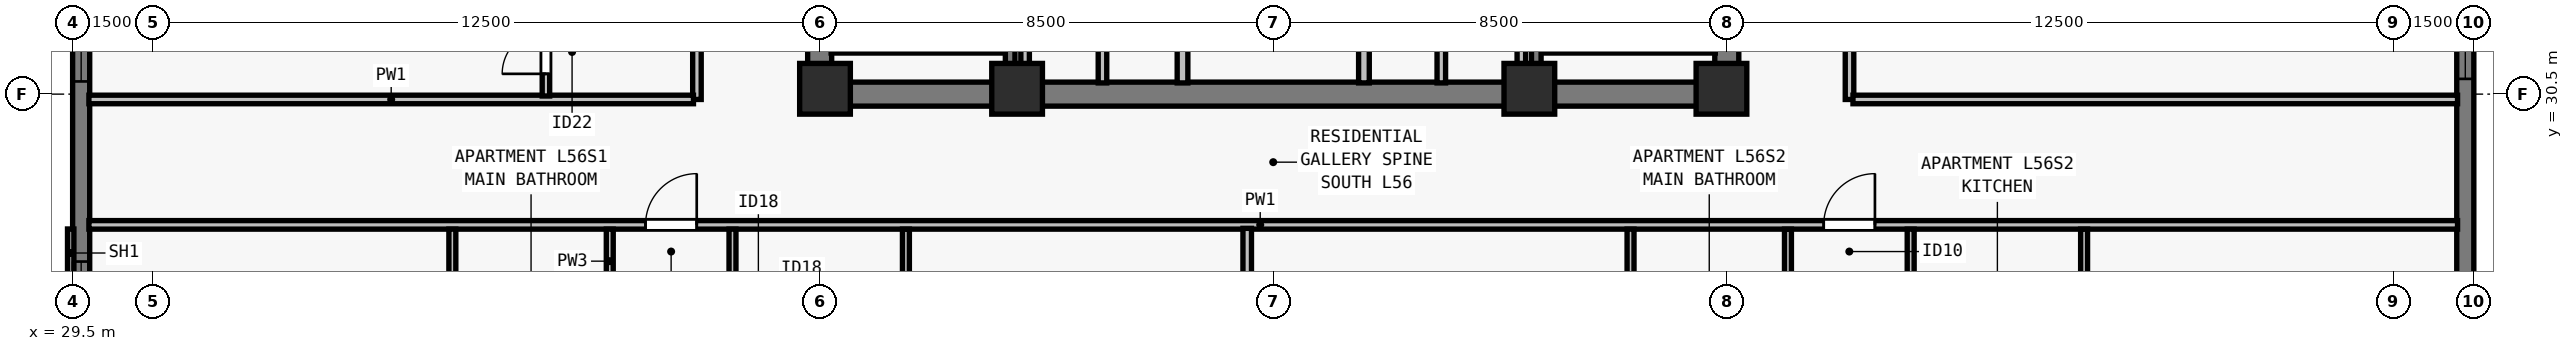
"""IFC4 building model, lengths in metres.
Left out: names, types, materials, properties, quantities, classifications, styles, units other than length and angle.
Written with IfcOpenShell. Run it as: python <this file> out.ifc"""

import sys

from ifc_helpers import new_model, si_unit, direction, frame, frame_2d, origin, origin_2d, place, context, subcontext, project, spatial, rectangle, extrude, element, fill, save


model = new_model("IFC4")
c1 = context("Model", 3, precision=1e-05, world=origin(), true_north=direction((0.0, 1.0)))
c2 = subcontext(c1, "Body", "Model", "MODEL_VIEW")
j1 = project(units=[si_unit("LENGTHUNIT", "METRE"), si_unit("PLANEANGLEUNIT", "RADIAN")], contexts=[c1])
p1 = place(None, origin())
s1 = spatial("IfcSite", under=j1, at=p1, CompositionType="ELEMENT")
p2 = place(p1, origin())
s2 = spatial("IfcBuilding", under=s1, at=p2, CompositionType="ELEMENT")
p3 = place(p2, frame((0.0, 0.0, 206.0)))
s3 = spatial("IfcBuildingStorey", under=s2, at=p3, CompositionType="ELEMENT", Elevation=206.0)
for number, where, z_axis, x_axis in (
    (1, (43.6, 30.6, 0.0), (0.0, 0.0, 1.0), (1.0, 0.0, 0.0)),
    (2, (47.2, 30.6, 0.0), (0.0, 0.0, 1.0), (1.0, 0.0, 0.0)),
    (3, (56.8, 30.6, 0.0), (0.0, 0.0, 1.0), (1.0, 0.0, 0.0)),
    (4, (60.4, 30.6, 0.0), (0.0, 0.0, 1.0), (1.0, 0.0, 0.0)),
):
    element("IfcColumn", number, at=place(p3, frame(where, z_axis=z_axis, x_axis=x_axis)), inside=s3, PredefinedType="COLUMN", context=c2, shape_type="SweptSolid", body=[
        extrude(rectangle(XDim=0.95, YDim=0.95, at=origin_2d()), origin(), (0.0, 0.0, 1.0), 3.5),
    ])
p4 = place(p3, frame((74.34, 56.5, 0.0), z_axis=(0.0, 0.0, 1.0), x_axis=(0.0, -1.0, 0.0)))
e5 = element("IfcWall", 5, at=p4, inside=s3, PredefinedType="SOLIDWALL", context=c2, shape_type="SweptSolid", body=[
    extrude(rectangle(XDim=34.702, YDim=0.32, at=frame_2d((17.351, 0.0))), origin(), (0.0, 0.0, 1.0), 3.29),
])
p5 = place(p4, frame((4.312, 0.0, 0.8)))
e6 = element("IfcOpeningElement", 6, at=p5, cuts=e5, PredefinedType="OPENING", context=c2, shape_type="SweptSolid", body=[
    extrude(rectangle(XDim=1.55, YDim=1.678, at=frame_2d((0.775, 0.839))), frame((0.0, 0.17, 0.0), z_axis=(0.0, -1.0, 0.0), x_axis=(1.0, 0.0, 0.0)), (0.0, 0.0, 1.0), 0.34),
])
p6 = place(p4, frame((9.238, 0.0, 0.8)))
e7 = element("IfcOpeningElement", 7, at=p6, cuts=e5, PredefinedType="OPENING", context=c2, shape_type="SweptSolid", body=[
    extrude(rectangle(XDim=1.85, YDim=1.678, at=frame_2d((0.925, 0.839))), frame((0.0, 0.17, 0.0), z_axis=(0.0, -1.0, 0.0), x_axis=(1.0, 0.0, 0.0)), (0.0, 0.0, 1.0), 0.34),
])
p7 = place(p4, frame((14.738, 0.0, 0.8)))
e8 = element("IfcOpeningElement", 8, at=p7, cuts=e5, PredefinedType="OPENING", context=c2, shape_type="SweptSolid", body=[
    extrude(rectangle(XDim=1.85, YDim=1.678, at=frame_2d((0.925, 0.839))), frame((0.0, 0.17, 0.0), z_axis=(0.0, -1.0, 0.0), x_axis=(1.0, 0.0, 0.0)), (0.0, 0.0, 1.0), 0.34),
])
p8 = place(p4, frame((18.264, 0.0, 0.8)))
e9 = element("IfcOpeningElement", 9, at=p8, cuts=e5, PredefinedType="OPENING", context=c2, shape_type="SweptSolid", body=[
    extrude(rectangle(XDim=1.55, YDim=1.678, at=frame_2d((0.775, 0.839))), frame((0.0, 0.17, 0.0), z_axis=(0.0, -1.0, 0.0), x_axis=(1.0, 0.0, 0.0)), (0.0, 0.0, 1.0), 0.34),
])
p9 = place(p4, frame((24.164, 0.0, 0.8)))
e10 = element("IfcOpeningElement", 10, at=p9, cuts=e5, PredefinedType="OPENING", context=c2, shape_type="SweptSolid", body=[
    extrude(rectangle(XDim=1.55, YDim=1.678, at=frame_2d((0.775, 0.839))), frame((0.0, 0.17, 0.0), z_axis=(0.0, -1.0, 0.0), x_axis=(1.0, 0.0, 0.0)), (0.0, 0.0, 1.0), 0.34),
])
p10 = place(p3, frame((29.66, 21.5, 0.0), z_axis=(0.0, 0.0, 1.0), x_axis=(0.0, 1.0, 0.0)))
e11 = element("IfcWall", 11, at=p10, inside=s3, PredefinedType="SOLIDWALL", context=c2, shape_type="SweptSolid", body=[
    extrude(rectangle(XDim=34.702, YDim=0.32, at=frame_2d((17.351, 0.0))), origin(), (0.0, 0.0, 1.0), 3.29),
])
p11 = place(p10, frame((4.312, 0.0, 0.8)))
e12 = element("IfcOpeningElement", 12, at=p11, cuts=e11, PredefinedType="OPENING", context=c2, shape_type="SweptSolid", body=[
    extrude(rectangle(XDim=1.55, YDim=1.678, at=frame_2d((0.775, 0.839))), frame((0.0, 0.17, 0.0), z_axis=(0.0, -1.0, 0.0), x_axis=(1.0, 0.0, 0.0)), (0.0, 0.0, 1.0), 0.34),
])
p12 = place(p10, frame((9.238, 0.0, 0.8)))
e13 = element("IfcOpeningElement", 13, at=p12, cuts=e11, PredefinedType="OPENING", context=c2, shape_type="SweptSolid", body=[
    extrude(rectangle(XDim=1.85, YDim=1.678, at=frame_2d((0.925, 0.839))), frame((0.0, 0.17, 0.0), z_axis=(0.0, -1.0, 0.0), x_axis=(1.0, 0.0, 0.0)), (0.0, 0.0, 1.0), 0.34),
])
p13 = place(p10, frame((14.738, 0.0, 0.8)))
e14 = element("IfcOpeningElement", 14, at=p13, cuts=e11, PredefinedType="OPENING", context=c2, shape_type="SweptSolid", body=[
    extrude(rectangle(XDim=1.85, YDim=1.678, at=frame_2d((0.925, 0.839))), frame((0.0, 0.17, 0.0), z_axis=(0.0, -1.0, 0.0), x_axis=(1.0, 0.0, 0.0)), (0.0, 0.0, 1.0), 0.34),
])
p14 = place(p10, frame((17.014, 0.0, 0.8)))
e15 = element("IfcOpeningElement", 15, at=p14, cuts=e11, PredefinedType="OPENING", context=c2, shape_type="SweptSolid", body=[
    extrude(rectangle(XDim=1.55, YDim=1.678, at=frame_2d((0.775, 0.839))), frame((0.0, 0.17, 0.0), z_axis=(0.0, -1.0, 0.0), x_axis=(1.0, 0.0, 0.0)), (0.0, 0.0, 1.0), 0.34),
])
p15 = place(p10, frame((24.164, 0.0, 0.8)))
e16 = element("IfcOpeningElement", 16, at=p15, cuts=e11, PredefinedType="OPENING", context=c2, shape_type="SweptSolid", body=[
    extrude(rectangle(XDim=1.55, YDim=1.678, at=frame_2d((0.775, 0.839))), frame((0.0, 0.17, 0.0), z_axis=(0.0, -1.0, 0.0), x_axis=(1.0, 0.0, 0.0)), (0.0, 0.0, 1.0), 0.34),
])
p16 = place(p3, frame((43.275, 30.5, 0.0), z_axis=(0.0, 0.0, 1.0), x_axis=(1.0, 0.0, 0.0)))
e17 = element("IfcWall", 17, at=p16, inside=s3, PredefinedType="SHEAR", context=c2, shape_type="SweptSolid", body=[
    extrude(rectangle(XDim=17.45, YDim=0.45, at=frame_2d((8.725, 0.0))), origin(), (0.0, 0.0, 1.0), 3.29),
])
for number, where, z_axis, x_axis in (
    (18, (43.5, 30.715, 0.0), (0.0, 0.0, 1.0), (0.0, 1.0, 0.0)),
    (19, (60.5, 30.715, 0.0), (0.0, 0.0, 1.0), (0.0, 1.0, 0.0)),
):
    element("IfcWall", number, at=place(p3, frame(where, z_axis=z_axis, x_axis=x_axis)), inside=s3, PredefinedType="SHEAR", context=c2, shape_type="SweptSolid", body=[
        extrude(rectangle(XDim=8.035, YDim=0.45, at=frame_2d((4.018, 0.0))), origin(), (0.0, 0.0, 1.0), 3.29),
    ])
p17 = place(p3, frame((50.3, 30.71, 0.0), z_axis=(0.0, 0.0, 1.0), x_axis=(0.0, 1.0, 0.0)))
e20 = element("IfcWall", 20, at=p17, inside=s3, PredefinedType="SOLIDWALL", context=c2, shape_type="SweptSolid", body=[
    extrude(rectangle(XDim=7.905, YDim=0.2, at=frame_2d((3.953, 0.0))), origin(), (0.0, 0.0, 1.0), 3.29),
])
p18 = place(p17, frame((2.14, 0.0, 0.0)))
e21 = element("IfcOpeningElement", 21, at=p18, cuts=e20, PredefinedType="OPENING", context=c2, shape_type="SweptSolid", body=[
    extrude(rectangle(XDim=0.95, YDim=2.12, at=frame_2d((0.475, 1.06))), frame((0.0, 0.11, 0.0), z_axis=(0.0, -1.0, 0.0), x_axis=(1.0, 0.0, 0.0)), (0.0, 0.0, 1.0), 0.22),
])
p19 = place(p3, frame((53.7, 30.71, 0.0), z_axis=(0.0, 0.0, 1.0), x_axis=(0.0, 1.0, 0.0)))
e22 = element("IfcWall", 22, at=p19, inside=s3, PredefinedType="SOLIDWALL", context=c2, shape_type="SweptSolid", body=[
    extrude(rectangle(XDim=7.905, YDim=0.2, at=frame_2d((3.953, 0.0))), origin(), (0.0, 0.0, 1.0), 3.29),
])
p20 = place(p19, frame((2.14, 0.0, 0.0)))
e23 = element("IfcOpeningElement", 23, at=p20, cuts=e22, PredefinedType="OPENING", context=c2, shape_type="SweptSolid", body=[
    extrude(rectangle(XDim=0.95, YDim=2.12, at=frame_2d((0.475, 1.06))), frame((0.0, 0.11, 0.0), z_axis=(0.0, -1.0, 0.0), x_axis=(1.0, 0.0, 0.0)), (0.0, 0.0, 1.0), 0.22),
])
p21 = place(p3, frame((47.35, 30.71, 0.0), z_axis=(0.0, 0.0, 1.0), x_axis=(0.0, 1.0, 0.0)))
e24 = element("IfcWall", 24, at=p21, inside=s3, PredefinedType="PARTITIONING", context=c2, shape_type="SweptSolid", body=[
    extrude(rectangle(XDim=7.905, YDim=0.16, at=frame_2d((3.953, 0.0))), origin(), (0.0, 0.0, 1.0), 3.29),
])
p22 = place(p3, frame((48.8, 30.71, 0.0), z_axis=(0.0, 0.0, 1.0), x_axis=(0.0, 1.0, 0.0)))
e25 = element("IfcWall", 25, at=p22, inside=s3, PredefinedType="PARTITIONING", context=c2, shape_type="SweptSolid", body=[
    extrude(rectangle(XDim=7.905, YDim=0.16, at=frame_2d((3.953, 0.0))), origin(), (0.0, 0.0, 1.0), 3.29),
])
p23 = place(p22, frame((3.54, 0.0, 0.0)))
e26 = element("IfcOpeningElement", 26, at=p23, cuts=e25, PredefinedType="OPENING", context=c2, shape_type="SweptSolid", body=[
    extrude(rectangle(XDim=0.85, YDim=2.12, at=frame_2d((0.425, 1.06))), frame((0.0, 0.09, 0.0), z_axis=(0.0, -1.0, 0.0), x_axis=(1.0, 0.0, 0.0)), (0.0, 0.0, 1.0), 0.18),
])
p24 = place(p3, frame((56.65, 30.71, 0.0), z_axis=(0.0, 0.0, 1.0), x_axis=(0.0, 1.0, 0.0)))
e27 = element("IfcWall", 27, at=p24, inside=s3, PredefinedType="PARTITIONING", context=c2, shape_type="SweptSolid", body=[
    extrude(rectangle(XDim=7.905, YDim=0.16, at=frame_2d((3.953, 0.0))), origin(), (0.0, 0.0, 1.0), 3.29),
])
p25 = place(p3, frame((55.15, 30.71, 0.0), z_axis=(0.0, 0.0, 1.0), x_axis=(0.0, 1.0, 0.0)))
e28 = element("IfcWall", 28, at=p25, inside=s3, PredefinedType="PARTITIONING", context=c2, shape_type="SweptSolid", body=[
    extrude(rectangle(XDim=7.905, YDim=0.16, at=frame_2d((3.953, 0.0))), origin(), (0.0, 0.0, 1.0), 3.29),
])
p26 = place(p25, frame((3.54, 0.0, 0.0)))
e29 = element("IfcOpeningElement", 29, at=p26, cuts=e28, PredefinedType="OPENING", context=c2, shape_type="SweptSolid", body=[
    extrude(rectangle(XDim=0.85, YDim=2.12, at=frame_2d((0.425, 1.06))), frame((0.0, 0.09, 0.0), z_axis=(0.0, -1.0, 0.0), x_axis=(1.0, 0.0, 0.0)), (0.0, 0.0, 1.0), 0.18),
])
p27 = place(p3, frame((29.805, 28.05, 0.0), z_axis=(0.0, 0.0, 1.0), x_axis=(1.0, 0.0, 0.0)))
e30 = element("IfcWall", 30, at=p27, inside=s3, PredefinedType="PARTITIONING", context=c2, shape_type="SweptSolid", body=[
    extrude(rectangle(XDim=44.39, YDim=0.16, at=frame_2d((22.195, 0.0))), origin(), (0.0, 0.0, 1.0), 2.958),
])
p28 = place(p27, frame((10.431, 0.0, 0.0)))
e31 = element("IfcOpeningElement", 31, at=p28, cuts=e30, PredefinedType="OPENING", context=c2, shape_type="SweptSolid", body=[
    extrude(rectangle(XDim=0.96, YDim=2.18, at=frame_2d((0.48, 1.09))), frame((0.0, 0.09, 0.0), z_axis=(0.0, -1.0, 0.0), x_axis=(1.0, 0.0, 0.0)), (0.0, 0.0, 1.0), 0.18),
])
p29 = place(p27, frame((32.511, 0.0, 0.0)))
e32 = element("IfcOpeningElement", 32, at=p29, cuts=e30, PredefinedType="OPENING", context=c2, shape_type="SweptSolid", body=[
    extrude(rectangle(XDim=0.96, YDim=2.18, at=frame_2d((0.48, 1.09))), frame((0.0, 0.09, 0.0), z_axis=(0.0, -1.0, 0.0), x_axis=(1.0, 0.0, 0.0)), (0.0, 0.0, 1.0), 0.18),
])
p30 = place(p3, frame((41.2, 30.4, 0.0), z_axis=(0.0, 0.0, 1.0), x_axis=(0.0, 1.0, 0.0)))
e33 = element("IfcWall", 33, at=p30, inside=s3, PredefinedType="PARTITIONING", context=c2, shape_type="SweptSolid", body=[
    extrude(rectangle(XDim=17.2, YDim=0.16, at=frame_2d((8.6, 0.0))), origin(), (0.0, 0.0, 1.0), 3.29),
])
p31 = place(p30, frame((8.12, 0.0, 0.0)))
e34 = element("IfcOpeningElement", 34, at=p31, cuts=e33, PredefinedType="OPENING", context=c2, shape_type="SweptSolid", body=[
    extrude(rectangle(XDim=0.96, YDim=2.18, at=frame_2d((0.48, 1.09))), frame((0.0, 0.09, 0.0), z_axis=(0.0, -1.0, 0.0), x_axis=(1.0, 0.0, 0.0)), (0.0, 0.0, 1.0), 0.18),
])
p32 = place(p3, frame((62.8, 30.4, 0.0), z_axis=(0.0, 0.0, 1.0), x_axis=(0.0, 1.0, 0.0)))
e35 = element("IfcWall", 35, at=p32, inside=s3, PredefinedType="PARTITIONING", context=c2, shape_type="SweptSolid", body=[
    extrude(rectangle(XDim=17.2, YDim=0.16, at=frame_2d((8.6, 0.0))), origin(), (0.0, 0.0, 1.0), 3.29),
])
p33 = place(p32, frame((3.6, 0.0, 0.0)))
e36 = element("IfcOpeningElement", 36, at=p33, cuts=e35, PredefinedType="OPENING", context=c2, shape_type="SweptSolid", body=[
    extrude(rectangle(XDim=0.96, YDim=2.12, at=frame_2d((0.48, 1.06))), frame((0.0, 0.09, 0.0), z_axis=(0.0, -1.0, 0.0), x_axis=(1.0, 0.0, 0.0)), (0.0, 0.0, 1.0), 0.18),
])
p34 = place(p32, frame((12.44, 0.0, 0.0)))
e37 = element("IfcOpeningElement", 37, at=p34, cuts=e35, PredefinedType="OPENING", context=c2, shape_type="SweptSolid", body=[
    extrude(rectangle(XDim=0.96, YDim=2.18, at=frame_2d((0.48, 1.09))), frame((0.0, 0.09, 0.0), z_axis=(0.0, -1.0, 0.0), x_axis=(1.0, 0.0, 0.0)), (0.0, 0.0, 1.0), 0.18),
])
for number, where, z_axis, x_axis in (
    (38, (29.805, 30.4, 0.0), (0.0, 0.0, 1.0), (1.0, 0.0, 0.0)),
    (39, (62.865, 30.4, 0.0), (0.0, 0.0, 1.0), (1.0, 0.0, 0.0)),
):
    element("IfcWall", number, at=place(p3, frame(where, z_axis=z_axis, x_axis=x_axis)), inside=s3, PredefinedType="PARTITIONING", context=c2, shape_type="SweptSolid", body=[
        extrude(rectangle(XDim=11.33, YDim=0.16, at=frame_2d((5.665, 0.0))), origin(), (0.0, 0.0, 1.0), 3.29),
    ])
p35 = place(p3, frame((36.616, 25.22, 0.0), z_axis=(0.0, 0.0, 1.0), x_axis=(0.0, 1.0, 0.0)))
e40 = element("IfcWall", 40, at=p35, inside=s3, PredefinedType="PLUMBINGWALL", context=c2, shape_type="SweptSolid", body=[
    extrude(rectangle(XDim=2.75, YDim=0.13, at=frame_2d((1.375, 0.0))), origin(), (0.0, 0.0, 1.0), 3.29),
])
p36 = place(p3, frame((39.566, 25.22, 0.0), z_axis=(0.0, 0.0, 1.0), x_axis=(0.0, 1.0, 0.0)))
e41 = element("IfcWall", 41, at=p36, inside=s3, PredefinedType="PLUMBINGWALL", context=c2, shape_type="SweptSolid", body=[
    extrude(rectangle(XDim=2.75, YDim=0.13, at=frame_2d((1.375, 0.0))), origin(), (0.0, 0.0, 1.0), 3.29),
])
p37 = place(p36, frame((0.55, 0.0, 0.0)))
e42 = element("IfcOpeningElement", 42, at=p37, cuts=e41, PredefinedType="OPENING", context=c2, shape_type="SweptSolid", body=[
    extrude(rectangle(XDim=0.85, YDim=2.08, at=frame_2d((0.425, 1.04))), frame((0.0, 0.075, 0.0), z_axis=(0.0, -1.0, 0.0), x_axis=(1.0, 0.0, 0.0)), (0.0, 0.0, 1.0), 0.15),
])
p38 = place(p3, frame((45.116, 25.22, 0.0), z_axis=(0.0, 0.0, 1.0), x_axis=(0.0, 1.0, 0.0)))
e43 = element("IfcWall", 43, at=p38, inside=s3, PredefinedType="PLUMBINGWALL", context=c2, shape_type="SweptSolid", body=[
    extrude(rectangle(XDim=2.75, YDim=0.13, at=frame_2d((1.375, 0.0))), origin(), (0.0, 0.0, 1.0), 3.29),
])
p39 = place(p3, frame((41.866, 25.22, 0.0), z_axis=(0.0, 0.0, 1.0), x_axis=(0.0, 1.0, 0.0)))
e44 = element("IfcWall", 44, at=p39, inside=s3, PredefinedType="PLUMBINGWALL", context=c2, shape_type="SweptSolid", body=[
    extrude(rectangle(XDim=2.75, YDim=0.13, at=frame_2d((1.375, 0.0))), origin(), (0.0, 0.0, 1.0), 2.573),
])
p40 = place(p39, frame((0.55, 0.0, 0.0)))
e45 = element("IfcOpeningElement", 45, at=p40, cuts=e44, PredefinedType="OPENING", context=c2, shape_type="SweptSolid", body=[
    extrude(rectangle(XDim=0.88, YDim=2.1, at=frame_2d((0.44, 1.05))), frame((0.0, 0.075, 0.0), z_axis=(0.0, -1.0, 0.0), x_axis=(1.0, 0.0, 0.0)), (0.0, 0.0, 1.0), 0.15),
])
p41 = place(p3, frame((51.512, 16.805, 0.0), z_axis=(0.0, 0.0, 1.0), x_axis=(0.0, 1.0, 0.0)))
e46 = element("IfcWall", 46, at=p41, inside=s3, PredefinedType="PARTITIONING", context=c2, shape_type="SweptSolid", body=[
    extrude(rectangle(XDim=11.18, YDim=0.16, at=frame_2d((5.59, 0.0))), origin(), (0.0, 0.0, 1.0), 2.958),
])
p42 = place(p3, frame((58.696, 25.22, 0.0), z_axis=(0.0, 0.0, 1.0), x_axis=(0.0, 1.0, 0.0)))
e47 = element("IfcWall", 47, at=p42, inside=s3, PredefinedType="PLUMBINGWALL", context=c2, shape_type="SweptSolid", body=[
    extrude(rectangle(XDim=2.75, YDim=0.13, at=frame_2d((1.375, 0.0))), origin(), (0.0, 0.0, 1.0), 3.29),
])
p43 = place(p3, frame((61.646, 25.22, 0.0), z_axis=(0.0, 0.0, 1.0), x_axis=(0.0, 1.0, 0.0)))
e48 = element("IfcWall", 48, at=p43, inside=s3, PredefinedType="PLUMBINGWALL", context=c2, shape_type="SweptSolid", body=[
    extrude(rectangle(XDim=2.75, YDim=0.13, at=frame_2d((1.375, 0.0))), origin(), (0.0, 0.0, 1.0), 3.29),
])
p44 = place(p43, frame((0.55, 0.0, 0.0)))
e49 = element("IfcOpeningElement", 49, at=p44, cuts=e48, PredefinedType="OPENING", context=c2, shape_type="SweptSolid", body=[
    extrude(rectangle(XDim=0.85, YDim=2.08, at=frame_2d((0.425, 1.04))), frame((0.0, 0.075, 0.0), z_axis=(0.0, -1.0, 0.0), x_axis=(1.0, 0.0, 0.0)), (0.0, 0.0, 1.0), 0.15),
])
p45 = place(p3, frame((67.196, 25.22, 0.0), z_axis=(0.0, 0.0, 1.0), x_axis=(0.0, 1.0, 0.0)))
e50 = element("IfcWall", 50, at=p45, inside=s3, PredefinedType="PLUMBINGWALL", context=c2, shape_type="SweptSolid", body=[
    extrude(rectangle(XDim=2.75, YDim=0.13, at=frame_2d((1.375, 0.0))), origin(), (0.0, 0.0, 1.0), 3.29),
])
p46 = place(p3, frame((63.946, 25.22, 0.0), z_axis=(0.0, 0.0, 1.0), x_axis=(0.0, 1.0, 0.0)))
e51 = element("IfcWall", 51, at=p46, inside=s3, PredefinedType="PLUMBINGWALL", context=c2, shape_type="SweptSolid", body=[
    extrude(rectangle(XDim=2.75, YDim=0.13, at=frame_2d((1.375, 0.0))), origin(), (0.0, 0.0, 1.0), 2.573),
])
p47 = place(p46, frame((0.55, 0.0, 0.0)))
e52 = element("IfcOpeningElement", 52, at=p47, cuts=e51, PredefinedType="OPENING", context=c2, shape_type="SweptSolid", body=[
    extrude(rectangle(XDim=0.88, YDim=2.1, at=frame_2d((0.44, 1.05))), frame((0.0, 0.075, 0.0), z_axis=(0.0, -1.0, 0.0), x_axis=(1.0, 0.0, 0.0)), (0.0, 0.0, 1.0), 0.15),
])
p48 = place(p3, frame((38.37, 30.465, 0.0), z_axis=(0.0, 0.0, 1.0), x_axis=(0.0, 1.0, 0.0)))
e53 = element("IfcWall", 53, at=p48, inside=s3, PredefinedType="PARTITIONING", context=c2, shape_type="SweptSolid", body=[
    extrude(rectangle(XDim=4.16, YDim=0.14, at=frame_2d((2.08, 0.0))), origin(), (0.0, 0.0, 1.0), 3.29),
])
p49 = place(p48, frame((0.415, 0.0, 0.0)))
e54 = element("IfcOpeningElement", 54, at=p49, cuts=e53, PredefinedType="OPENING", context=c2, shape_type="SweptSolid", body=[
    extrude(rectangle(XDim=0.82, YDim=2.1, at=frame_2d((0.41, 1.05))), frame((0.0, 0.08, 0.0), z_axis=(0.0, -1.0, 0.0), x_axis=(1.0, 0.0, 0.0)), (0.0, 0.0, 1.0), 0.16),
])
p50 = place(p3, frame((43.715, 31.36, 0.0), z_axis=(0.0, 0.0, 1.0), x_axis=(1.0, 0.0, 0.0)))
e55 = element("IfcWall", 55, at=p50, inside=s3, PredefinedType="SOLIDWALL", context=c2, shape_type="SweptSolid", body=[
    extrude(rectangle(XDim=3.28, YDim=0.18, at=frame_2d((1.64, 0.0))), origin(), (0.0, 0.0, 1.0), 3.29),
])
p51 = place(p3, frame((47.07, 38.78, 0.0), z_axis=(0.0, 0.0, 1.0), x_axis=(0.0, -1.0, 0.0)))
e56 = element("IfcWall", 56, at=p51, inside=s3, PredefinedType="SOLIDWALL", context=c2, shape_type="SweptSolid", body=[
    extrude(rectangle(XDim=8.067, YDim=0.18, at=frame_2d((4.034, 0.0))), origin(), (0.0, 0.0, 1.0), 3.29),
])
p52 = place(p3, frame((57.005, 31.36, 0.0), z_axis=(0.0, 0.0, 1.0), x_axis=(1.0, 0.0, 0.0)))
e57 = element("IfcWall", 57, at=p52, inside=s3, PredefinedType="SOLIDWALL", context=c2, shape_type="SweptSolid", body=[
    extrude(rectangle(XDim=3.28, YDim=0.18, at=frame_2d((1.64, 0.0))), origin(), (0.0, 0.0, 1.0), 3.29),
])
p53 = place(p3, frame((56.93, 38.78, 0.0), z_axis=(0.0, 0.0, 1.0), x_axis=(0.0, -1.0, 0.0)))
e58 = element("IfcWall", 58, at=p53, inside=s3, PredefinedType="SOLIDWALL", context=c2, shape_type="SweptSolid", body=[
    extrude(rectangle(XDim=8.067, YDim=0.18, at=frame_2d((4.034, 0.0))), origin(), (0.0, 0.0, 1.0), 3.29),
])
p54 = place(p9, origin())
e59 = element("IfcWindow", 59, at=p54, inside=s3, PartitioningType="SINGLE_PANEL", PredefinedType="WINDOW", context=c2, shape_type="SweptSolid", body=[
    extrude(rectangle(XDim=1.55, YDim=1.678, at=frame_2d((0.775, 0.839))), frame((0.0, -0.05, 0.0), z_axis=(0.0, -1.0, 0.0), x_axis=(1.0, 0.0, 0.0)), (0.0, 0.0, 1.0), 0.06),
])
fill(e10, e59)
p55 = place(p11, origin())
e60 = element("IfcWindow", 60, at=p55, inside=s3, PartitioningType="SINGLE_PANEL", PredefinedType="WINDOW", context=c2, shape_type="SweptSolid", body=[
    extrude(rectangle(XDim=1.55, YDim=1.678, at=frame_2d((0.775, 0.839))), frame((0.0, -0.05, 0.0), z_axis=(0.0, -1.0, 0.0), x_axis=(1.0, 0.0, 0.0)), (0.0, 0.0, 1.0), 0.06),
])
fill(e12, e60)
p56 = place(p12, origin())
e61 = element("IfcWindow", 61, at=p56, inside=s3, PartitioningType="SINGLE_PANEL", PredefinedType="WINDOW", context=c2, shape_type="SweptSolid", body=[
    extrude(rectangle(XDim=1.85, YDim=1.678, at=frame_2d((0.925, 0.839))), frame((0.0, -0.05, 0.0), z_axis=(0.0, -1.0, 0.0), x_axis=(1.0, 0.0, 0.0)), (0.0, 0.0, 1.0), 0.06),
])
fill(e13, e61)
p57 = place(p28, origin())
e62 = element("IfcDoor", 62, at=p57, inside=s3, OperationType="SINGLE_SWING_RIGHT", PredefinedType="DOOR", context=c2, shape_type="SweptSolid", body=[
    extrude(rectangle(XDim=0.96, YDim=2.18, at=frame_2d((0.48, 1.09))), frame((0.0, 0.025, 0.0), z_axis=(0.0, -1.0, 0.0), x_axis=(1.0, 0.0, 0.0)), (0.0, 0.0, 1.0), 0.05),
])
fill(e31, e62)
p58 = place(p29, origin())
e63 = element("IfcDoor", 63, at=p58, inside=s3, OperationType="SINGLE_SWING_RIGHT", PredefinedType="DOOR", context=c2, shape_type="SweptSolid", body=[
    extrude(rectangle(XDim=0.96, YDim=2.18, at=frame_2d((0.48, 1.09))), frame((0.0, 0.025, 0.0), z_axis=(0.0, -1.0, 0.0), x_axis=(1.0, 0.0, 0.0)), (0.0, 0.0, 1.0), 0.05),
])
fill(e32, e63)
p59 = place(p49, origin())
e64 = element("IfcDoor", 64, at=p59, inside=s3, OperationType="SINGLE_SWING_LEFT", PredefinedType="DOOR", context=c2, shape_type="SweptSolid", body=[
    extrude(rectangle(XDim=0.82, YDim=2.1, at=frame_2d((0.41, 1.05))), frame((0.0, 0.025, 0.0), z_axis=(0.0, -1.0, 0.0), x_axis=(1.0, 0.0, 0.0)), (0.0, 0.0, 1.0), 0.05),
])
fill(e54, e64)
save(model, sys.argv[1])
